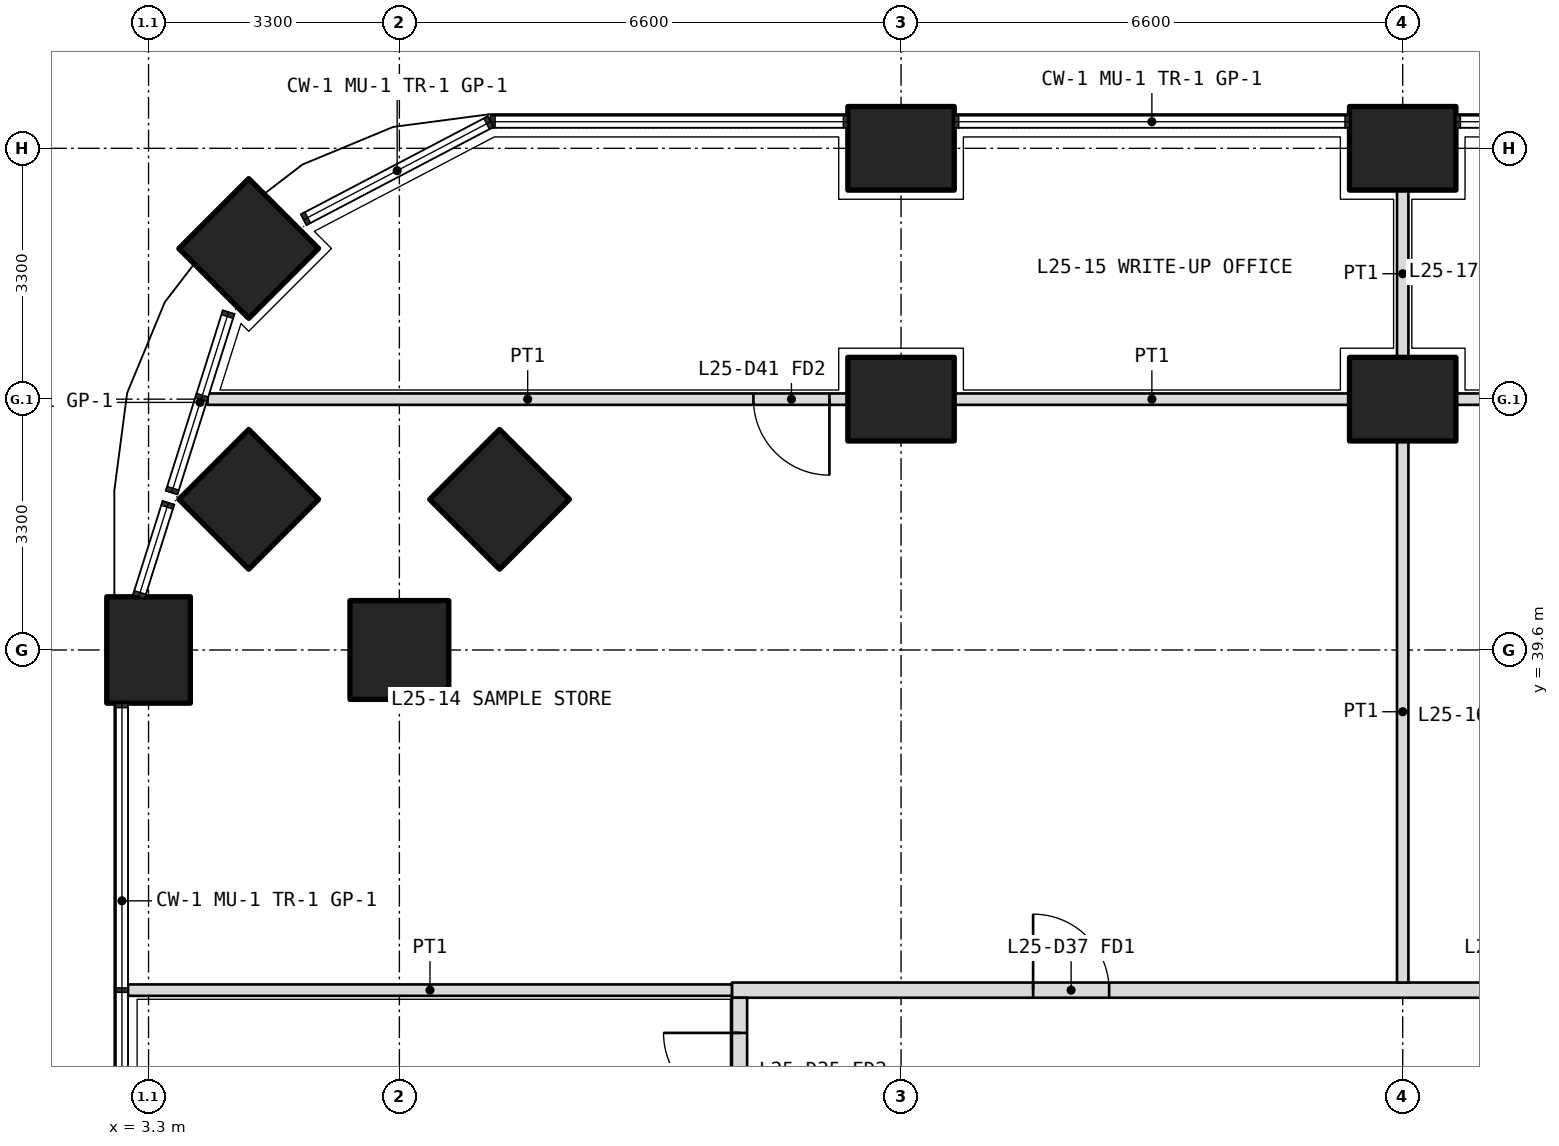
"""IFC4 building model, lengths in metres.
Left out: names, types, materials, properties, quantities, classifications, styles, units other than length and angle.
Written with IfcOpenShell. Run it as: python <this file> out.ifc"""

import sys

from ifc_helpers import new_model, si_unit, direction, frame, frame_2d, origin, origin_2d, place, context, subcontext, project, spatial, rectangle, extrude, element, fill, save


model = new_model("IFC4")
c1 = context("Model", 3, precision=1e-05, world=origin(), true_north=direction((0.0, 1.0)))
c2 = subcontext(c1, "Body", "Model", "MODEL_VIEW")
j1 = project(units=[si_unit("LENGTHUNIT", "METRE"), si_unit("PLANEANGLEUNIT", "RADIAN")], contexts=[c1])
p1 = place(None, origin())
s1 = spatial("IfcSite", under=j1, at=p1, CompositionType="ELEMENT")
p2 = place(p1, origin())
s2 = spatial("IfcBuilding", under=s1, at=p2, CompositionType="ELEMENT")
p3 = place(p2, frame((0.0, 0.0, 111.6)))
s3 = spatial("IfcBuildingStorey", under=s2, at=p3, CompositionType="ELEMENT", Elevation=111.6)
p4 = place(p3, frame((4.618, 44.882, 0.0), z_axis=(0.0, 0.0, 1.0), x_axis=(0.707106781187, 0.707106781187, 0.0)))
e1 = element("IfcColumn", 1, at=p4, inside=s3, PredefinedType="COLUMN", context=c2, shape_type="SweptSolid", body=[
    extrude(rectangle(XDim=1.3, YDim=1.3, at=origin_2d()), origin(), (0.0, 0.0, 1.0), 4.2),
])
for number, where, z_axis, x_axis in (
    (2, (3.3, 39.6, 0.0), (0.0, 0.0, 1.0), (0.0, 1.0, 0.0)),
    (3, (13.2, 46.2, 0.0), (0.0, 0.0, 1.0), (1.0, 0.0, 0.0)),
    (4, (19.8, 46.2, 0.0), (0.0, 0.0, 1.0), (1.0, 0.0, 0.0)),
):
    element("IfcColumn", number, at=place(p3, frame(where, z_axis=z_axis, x_axis=x_axis)), inside=s3, PredefinedType="COLUMN", context=c2, shape_type="SweptSolid", body=[
        extrude(rectangle(XDim=1.4, YDim=1.1, at=origin_2d()), origin(), (0.0, 0.0, 1.0), 4.2),
    ])
for number, where, z_axis, x_axis in (
    (5, (6.6, 39.6, 0.0), (0.0, 0.0, 1.0), (1.0, 0.0, 0.0)),
    (6, (4.618, 41.582, 0.0), (0.0, 0.0, 1.0), (0.707, 0.707, 0.0)),
):
    element("IfcColumn", number, at=place(p3, frame(where, z_axis=z_axis, x_axis=x_axis)), inside=s3, PredefinedType="COLUMN", context=c2, shape_type="SweptSolid", body=[
        extrude(rectangle(XDim=1.3, YDim=1.3, at=origin_2d()), origin(), (0.0, 0.0, 1.0), 4.2),
    ])
for number, where, z_axis, x_axis in (
    (7, (13.2, 42.9, 0.0), (0.0, 0.0, 1.0), (1.0, 0.0, 0.0)),
    (8, (19.8, 42.9, 0.0), (0.0, 0.0, 1.0), (1.0, 0.0, 0.0)),
):
    element("IfcColumn", number, at=place(p3, frame(where, z_axis=z_axis, x_axis=x_axis)), inside=s3, PredefinedType="COLUMN", context=c2, shape_type="SweptSolid", body=[
        extrude(rectangle(XDim=1.4, YDim=1.1, at=origin_2d()), origin(), (0.0, 0.0, 1.0), 4.2),
    ])
p5 = place(p3, frame((7.918, 41.582, 0.0), z_axis=(0.0, 0.0, 1.0), x_axis=(0.707106781187, 0.707106781187, 0.0)))
e9 = element("IfcColumn", 9, at=p5, inside=s3, PredefinedType="COLUMN", context=c2, shape_type="SweptSolid", body=[
    extrude(rectangle(XDim=1.3, YDim=1.3, at=origin_2d()), origin(), (0.0, 0.0, 1.0), 4.2),
])
p6 = place(p3, frame((10.975, 35.125, 0.0), z_axis=(0.0, 0.0, 1.0), x_axis=(1.0, 0.0, 0.0)))
e10 = element("IfcWall", 10, at=p6, inside=s3, PredefinedType="PARTITIONING", context=c2, shape_type="SweptSolid", body=[
    extrude(rectangle(XDim=30.85, YDim=0.2, at=frame_2d((15.425, 0.0))), origin(), (0.0, 0.0, 1.0), 2.85),
])
p7 = place(p6, frame((3.962, 0.0, 0.0)))
e11 = element("IfcOpeningElement", 11, at=p7, cuts=e10, PredefinedType="OPENING", context=c2, shape_type="SweptSolid", body=[
    extrude(rectangle(XDim=1.0, YDim=2.1, at=frame_2d((0.5, 1.05))), frame((0.0, 0.11, 0.0), z_axis=(0.0, -1.0, 0.0), x_axis=(1.0, 0.0, 0.0)), (0.0, 0.0, 1.0), 0.22),
])
p8 = place(p6, frame((9.975, 0.0, 0.0)))
e12 = element("IfcOpeningElement", 12, at=p8, cuts=e10, PredefinedType="OPENING", context=c2, shape_type="SweptSolid", body=[
    extrude(rectangle(XDim=1.0, YDim=2.1, at=frame_2d((0.5, 1.05))), frame((0.0, 0.11, 0.0), z_axis=(0.0, -1.0, 0.0), x_axis=(1.0, 0.0, 0.0)), (0.0, 0.0, 1.0), 0.22),
])
p9 = place(p6, frame((14.825, 0.0, 0.0)))
e13 = element("IfcOpeningElement", 13, at=p9, cuts=e10, PredefinedType="OPENING", context=c2, shape_type="SweptSolid", body=[
    extrude(rectangle(XDim=1.2, YDim=2.1, at=frame_2d((0.6, 1.05))), frame((0.0, 0.11, 0.0), z_axis=(0.0, -1.0, 0.0), x_axis=(1.0, 0.0, 0.0)), (0.0, 0.0, 1.0), 0.22),
])
p10 = place(p6, frame((24.238, 0.0, 0.0)))
e14 = element("IfcOpeningElement", 14, at=p10, cuts=e10, PredefinedType="OPENING", context=c2, shape_type="SweptSolid", body=[
    extrude(rectangle(XDim=1.0, YDim=2.1, at=frame_2d((0.5, 1.05))), frame((0.0, 0.11, 0.0), z_axis=(0.0, -1.0, 0.0), x_axis=(1.0, 0.0, 0.0)), (0.0, 0.0, 1.0), 0.22),
])
p11 = place(p3, frame((11.075, 7.4, 0.0), z_axis=(0.0, 0.0, 1.0), x_axis=(0.0, 1.0, 0.0)))
e15 = element("IfcWall", 15, at=p11, inside=s3, PredefinedType="PARTITIONING", context=c2, shape_type="SweptSolid", body=[
    extrude(rectangle(XDim=27.625, YDim=0.2, at=frame_2d((13.812, 0.0))), origin(), (0.0, 0.0, 1.0), 2.85),
])
p12 = place(p11, frame((2.35, 0.0, 0.0)))
e16 = element("IfcOpeningElement", 16, at=p12, cuts=e15, PredefinedType="OPENING", context=c2, shape_type="SweptSolid", body=[
    extrude(rectangle(XDim=1.0, YDim=2.1, at=frame_2d((0.5, 1.05))), frame((0.0, 0.11, 0.0), z_axis=(0.0, -1.0, 0.0), x_axis=(1.0, 0.0, 0.0)), (0.0, 0.0, 1.0), 0.22),
])
p13 = place(p11, frame((6.35, 0.0, 0.0)))
e17 = element("IfcOpeningElement", 17, at=p13, cuts=e15, PredefinedType="OPENING", context=c2, shape_type="SweptSolid", body=[
    extrude(rectangle(XDim=1.0, YDim=2.1, at=frame_2d((0.5, 1.05))), frame((0.0, 0.11, 0.0), z_axis=(0.0, -1.0, 0.0), x_axis=(1.0, 0.0, 0.0)), (0.0, 0.0, 1.0), 0.22),
])
p14 = place(p11, frame((9.425, 0.0, 0.0)))
e18 = element("IfcOpeningElement", 18, at=p14, cuts=e15, PredefinedType="OPENING", context=c2, shape_type="SweptSolid", body=[
    extrude(rectangle(XDim=0.9, YDim=2.1, at=frame_2d((0.45, 1.05))), frame((0.0, 0.11, 0.0), z_axis=(0.0, -1.0, 0.0), x_axis=(1.0, 0.0, 0.0)), (0.0, 0.0, 1.0), 0.22),
])
p15 = place(p11, frame((13.275, 0.0, 0.0)))
e19 = element("IfcOpeningElement", 19, at=p15, cuts=e15, PredefinedType="OPENING", context=c2, shape_type="SweptSolid", body=[
    extrude(rectangle(XDim=0.9, YDim=2.1, at=frame_2d((0.45, 1.05))), frame((0.0, 0.11, 0.0), z_axis=(0.0, -1.0, 0.0), x_axis=(1.0, 0.0, 0.0)), (0.0, 0.0, 1.0), 0.22),
])
p16 = place(p11, frame((16.8, 0.0, 0.0)))
e20 = element("IfcOpeningElement", 20, at=p16, cuts=e15, PredefinedType="OPENING", context=c2, shape_type="SweptSolid", body=[
    extrude(rectangle(XDim=1.0, YDim=2.1, at=frame_2d((0.5, 1.05))), frame((0.0, 0.11, 0.0), z_axis=(0.0, -1.0, 0.0), x_axis=(1.0, 0.0, 0.0)), (0.0, 0.0, 1.0), 0.22),
])
p17 = place(p11, frame((20.15, 0.0, 0.0)))
e21 = element("IfcOpeningElement", 21, at=p17, cuts=e15, PredefinedType="OPENING", context=c2, shape_type="SweptSolid", body=[
    extrude(rectangle(XDim=1.0, YDim=2.1, at=frame_2d((0.5, 1.05))), frame((0.0, 0.11, 0.0), z_axis=(0.0, -1.0, 0.0), x_axis=(1.0, 0.0, 0.0)), (0.0, 0.0, 1.0), 0.22),
])
p18 = place(p11, frame((23.45, 0.0, 0.0)))
e22 = element("IfcOpeningElement", 22, at=p18, cuts=e15, PredefinedType="OPENING", context=c2, shape_type="SweptSolid", body=[
    extrude(rectangle(XDim=1.0, YDim=2.1, at=frame_2d((0.5, 1.05))), frame((0.0, 0.11, 0.0), z_axis=(0.0, -1.0, 0.0), x_axis=(1.0, 0.0, 0.0)), (0.0, 0.0, 1.0), 0.22),
])
p19 = place(p11, frame((26.163, 0.0, 0.0)))
e23 = element("IfcOpeningElement", 23, at=p19, cuts=e15, PredefinedType="OPENING", context=c2, shape_type="SweptSolid", body=[
    extrude(rectangle(XDim=1.0, YDim=2.1, at=frame_2d((0.5, 1.05))), frame((0.0, 0.11, 0.0), z_axis=(0.0, -1.0, 0.0), x_axis=(1.0, 0.0, 0.0)), (0.0, 0.0, 1.0), 0.22),
])
p20 = place(p3, frame((3.03, 35.125, 0.0), z_axis=(0.0, 0.0, 1.0), x_axis=(1.0, 0.0, 0.0)))
e24 = element("IfcWall", 24, at=p20, inside=s3, PredefinedType="PARTITIONING", context=c2, shape_type="SweptSolid", body=[
    extrude(rectangle(XDim=7.945, YDim=0.15, at=frame_2d((3.973, 0.0))), origin(), (0.0, 0.0, 1.0), 2.7),
])
p21 = place(p3, frame((25.7, 42.9, 0.0), z_axis=(0.0, 0.0, 1.0), x_axis=(-1.0, 0.0, 0.0)))
e25 = element("IfcWall", 25, at=p21, inside=s3, PredefinedType="PARTITIONING", context=c2, shape_type="SweptSolid", body=[
    extrude(rectangle(XDim=5.2, YDim=0.15, at=frame_2d((2.6, 0.0))), origin(), (0.0, 0.0, 1.0), 3.9),
])
p22 = place(p21, frame((3.75, 0.0, 0.0)))
e26 = element("IfcOpeningElement", 26, at=p22, cuts=e25, PredefinedType="OPENING", context=c2, shape_type="SweptSolid", body=[
    extrude(rectangle(XDim=1.0, YDim=2.1, at=frame_2d((0.5, 1.05))), frame((0.0, 0.085, 0.0), z_axis=(0.0, -1.0, 0.0), x_axis=(1.0, 0.0, 0.0)), (0.0, 0.0, 1.0), 0.17),
])
p23 = place(p21, frame((0.25, 0.0, 0.0)))
e27 = element("IfcOpeningElement", 27, at=p23, cuts=e25, PredefinedType="OPENING", context=c2, shape_type="SweptSolid", body=[
    extrude(rectangle(XDim=1.0, YDim=2.1, at=frame_2d((0.5, 1.05))), frame((0.0, 0.085, 0.0), z_axis=(0.0, -1.0, 0.0), x_axis=(1.0, 0.0, 0.0)), (0.0, 0.0, 1.0), 0.17),
])
p24 = place(p3, frame((19.1, 42.9, 0.0), z_axis=(0.0, 0.0, 1.0), x_axis=(-1.0, 0.0, 0.0)))
e28 = element("IfcWall", 28, at=p24, inside=s3, PredefinedType="PARTITIONING", context=c2, shape_type="SweptSolid", body=[
    extrude(rectangle(XDim=5.2, YDim=0.15, at=frame_2d((2.6, 0.0))), origin(), (0.0, 0.0, 1.0), 3.9),
])
p25 = place(p3, frame((12.5, 42.9, 0.0), z_axis=(0.0, 0.0, 1.0), x_axis=(-1.0, 0.0, 0.0)))
e29 = element("IfcWall", 29, at=p25, inside=s3, PredefinedType="PARTITIONING", context=c2, shape_type="SweptSolid", body=[
    extrude(rectangle(XDim=8.424, YDim=0.15, at=frame_2d((4.212, 0.0))), origin(), (0.0, 0.0, 1.0), 2.7),
])
p26 = place(p25, frame((0.242, 0.0, 0.0)))
e30 = element("IfcOpeningElement", 30, at=p26, cuts=e29, PredefinedType="OPENING", context=c2, shape_type="SweptSolid", body=[
    extrude(rectangle(XDim=1.0, YDim=2.1, at=frame_2d((0.5, 1.05))), frame((0.0, 0.085, 0.0), z_axis=(0.0, -1.0, 0.0), x_axis=(1.0, 0.0, 0.0)), (0.0, 0.0, 1.0), 0.17),
])
p27 = place(p3, frame((19.8, 45.65, 0.0), z_axis=(0.0, 0.0, 1.0), x_axis=(0.0, -1.0, 0.0)))
e31 = element("IfcWall", 31, at=p27, inside=s3, PredefinedType="PARTITIONING", context=c2, shape_type="SweptSolid", body=[
    extrude(rectangle(XDim=2.2, YDim=0.15, at=frame_2d((1.1, 0.0))), origin(), (0.0, 0.0, 1.0), 2.85),
])
p28 = place(p3, frame((19.8, 42.35, 0.0), z_axis=(0.0, 0.0, 1.0), x_axis=(0.0, -1.0, 0.0)))
e32 = element("IfcWall", 32, at=p28, inside=s3, PredefinedType="PARTITIONING", context=c2, shape_type="SweptSolid", body=[
    extrude(rectangle(XDim=7.125, YDim=0.15, at=frame_2d((3.562, 0.0))), origin(), (0.0, 0.0, 1.0), 2.85),
])
p29 = place(p7, origin())
e33 = element("IfcDoor", 33, at=p29, inside=s3, OperationType="SINGLE_SWING_LEFT", PredefinedType="DOOR", context=c2, shape_type="SweptSolid", body=[
    extrude(rectangle(XDim=1.0, YDim=2.1, at=frame_2d((0.5, 1.05))), frame((0.0, 0.025, 0.0), z_axis=(0.0, -1.0, 0.0), x_axis=(1.0, 0.0, 0.0)), (0.0, 0.0, 1.0), 0.05),
])
fill(e11, e33)
p30 = place(p26, origin())
e34 = element("IfcDoor", 34, at=p30, inside=s3, OperationType="SINGLE_SWING_LEFT", PredefinedType="DOOR", context=c2, shape_type="SweptSolid", body=[
    extrude(rectangle(XDim=1.0, YDim=2.1, at=frame_2d((0.5, 1.05))), frame((0.0, 0.025, 0.0), z_axis=(0.0, -1.0, 0.0), x_axis=(1.0, 0.0, 0.0)), (0.0, 0.0, 1.0), 0.05),
])
fill(e30, e34)
p31 = place(p19, origin())
e35 = element("IfcDoor", 35, at=p31, inside=s3, OperationType="SINGLE_SWING_RIGHT", PredefinedType="DOOR", context=c2, shape_type="SweptSolid", body=[
    extrude(rectangle(XDim=1.0, YDim=2.1, at=frame_2d((0.5, 1.05))), frame((0.0, 0.025, 0.0), z_axis=(0.0, -1.0, 0.0), x_axis=(1.0, 0.0, 0.0)), (0.0, 0.0, 1.0), 0.05),
])
fill(e23, e35)
save(model, sys.argv[1])
